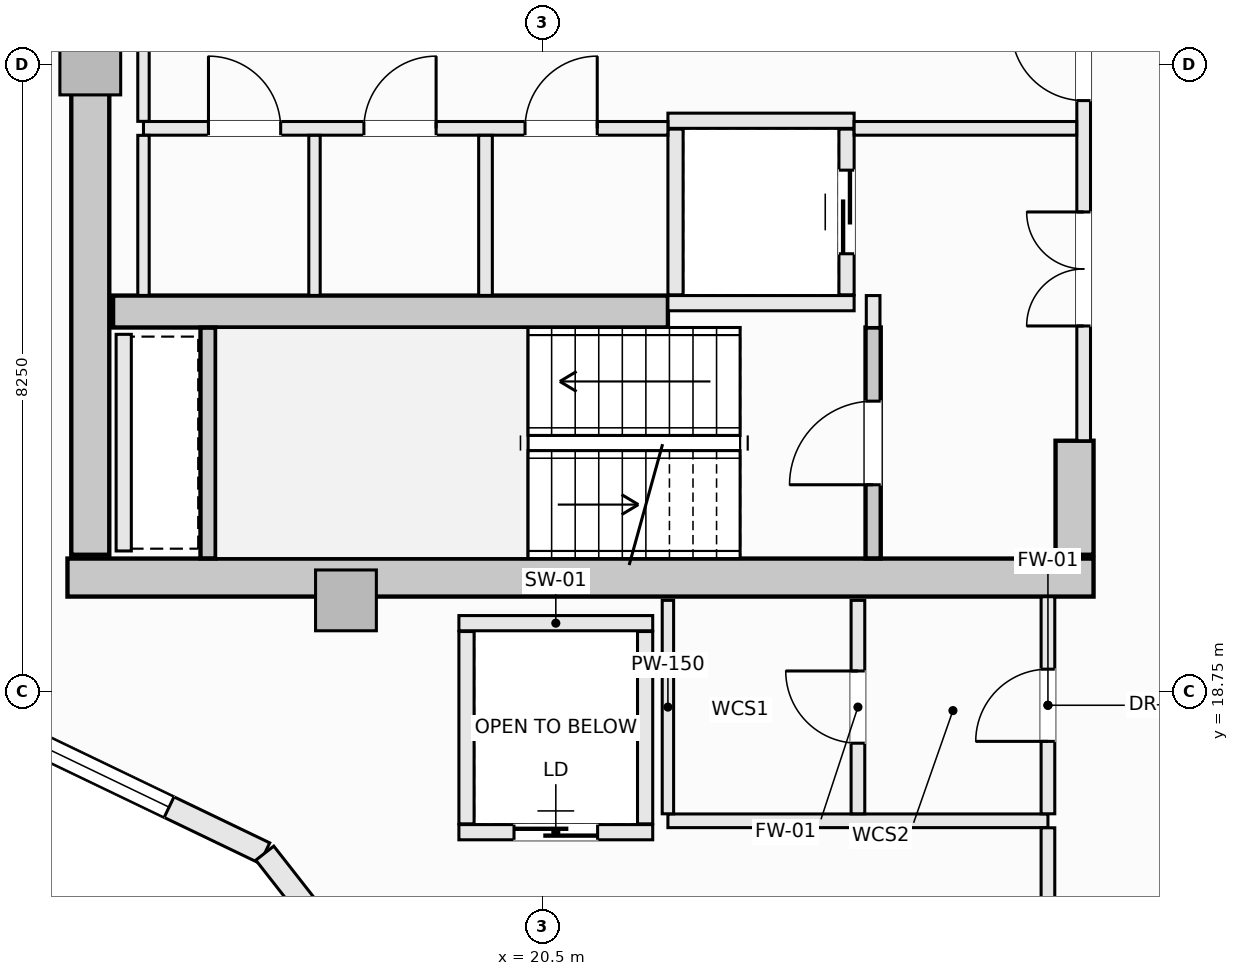
"""IFC4 building model, lengths in metres.
Left out: names, types, materials, properties, quantities, classifications, styles, units other than length and angle.
Written with IfcOpenShell. Run it as: python <this file> out.ifc"""

import sys

from ifc_helpers import new_model, si_unit, direction, frame, frame_2d, origin, origin_2d, place, context, subcontext, project, spatial, rectangle, extrude, element, fill, save


model = new_model("IFC4")
c1 = context("Model", 3, precision=1e-05, world=origin(), true_north=direction((0.0, 1.0)))
c2 = subcontext(c1, "Body", "Model", "MODEL_VIEW")
j1 = project(units=[si_unit("LENGTHUNIT", "METRE"), si_unit("PLANEANGLEUNIT", "RADIAN")], contexts=[c1])
p1 = place(None, origin())
s1 = spatial("IfcSite", under=j1, at=p1, CompositionType="ELEMENT")
p2 = place(p1, origin())
s2 = spatial("IfcBuilding", under=s1, at=p2, CompositionType="ELEMENT")
p3 = place(p2, frame((0.0, 0.0, 262.4)))
s3 = spatial("IfcBuildingStorey", under=s2, at=p3, CompositionType="ELEMENT", Elevation=262.4)
p4 = place(p3, frame((14.25, 20.25, -0.27), z_axis=(0.0, 0.0, 1.0), x_axis=(1.0, 0.0, 0.0)))
e1 = element("IfcWall", 1, at=p4, inside=s3, PredefinedType="SHEAR", context=c2, shape_type="SweptSolid", body=[
    extrude(rectangle(XDim=13.5, YDim=0.5, at=frame_2d((6.75, 0.0))), origin(), (0.0, 0.0, 1.0), 3.3),
])
p5 = place(p3, frame((14.55, 20.55, -0.27), z_axis=(0.0, 0.0, 1.0), x_axis=(0.0, 1.0, 0.0)))
e2 = element("IfcWall", 2, at=p5, inside=s3, PredefinedType="SHEAR", context=c2, shape_type="SweptSolid", body=[
    extrude(rectangle(XDim=12.9, YDim=0.5, at=frame_2d((6.45, 0.0))), origin(), (0.0, 0.0, 1.0), 3.3),
])
p6 = place(p3, frame((27.5, 20.55, -0.27), z_axis=(0.0, 0.0, 1.0), x_axis=(0.0, 1.0, 0.0)))
e3 = element("IfcWall", 3, at=p6, inside=s3, PredefinedType="SHEAR", context=c2, shape_type="SweptSolid", body=[
    extrude(rectangle(XDim=1.5, YDim=0.5, at=frame_2d((0.75, 0.0))), origin(), (0.0, 0.0, 1.0), 3.3),
])
p7 = place(p3, frame((14.85, 23.75, -0.27), z_axis=(0.0, 0.0, 1.0), x_axis=(1.0, 0.0, 0.0)))
e4 = element("IfcWall", 4, at=p7, inside=s3, PredefinedType="SHEAR", context=c2, shape_type="SweptSolid", body=[
    extrude(rectangle(XDim=7.3, YDim=0.42, at=frame_2d((3.65, 0.0))), origin(), (0.0, 0.0, 1.0), 3.3),
])
for number, where, z_axis, x_axis in (
    (5, (14.55, 27.0, -0.27), (0.0, 0.0, 1.0), (1.0, 0.0, 0.0)),
    (6, (17.914, 19.95, -0.27), (0.0, 0.0, 1.0), (1.0, 0.0, 0.0)),
):
    element("IfcColumn", number, at=place(p3, frame(where, z_axis=z_axis, x_axis=x_axis)), inside=s3, PredefinedType="PILASTER", context=c2, shape_type="SweptSolid", body=[
        extrude(rectangle(XDim=0.8, YDim=0.8, at=origin_2d()), origin(), (0.0, 0.0, 1.0), 3.3),
    ])
p8 = place(p3, frame((12.344, 18.788, 0.0), z_axis=(0.0, 0.0, 1.0), x_axis=(0.901346013132, -0.433099716706, 0.0)))
e7 = element("IfcWall", 7, at=p8, inside=s3, PredefinedType="SOLIDWALL", context=c2, shape_type="SweptSolid", body=[
    extrude(rectangle(XDim=4.994, YDim=0.3, at=frame_2d((2.497, 0.0))), origin(), (0.0, 0.0, 1.0), 2.605),
])
p9 = place(p8, frame((1.397, 0.0, 0.72)))
e8 = element("IfcOpeningElement", 8, at=p9, cuts=e7, PredefinedType="OPENING", context=c2, shape_type="SweptSolid", body=[
    extrude(rectangle(XDim=2.2, YDim=1.65, at=frame_2d((1.1, 0.825))), frame((0.0, 0.16, 0.0), z_axis=(0.0, -1.0, 0.0), x_axis=(1.0, 0.0, 0.0)), (0.0, 0.0, 1.0), 0.32),
])
p10 = place(p3, frame((16.846, 16.625, 0.0), z_axis=(0.0, 0.0, 1.0), x_axis=(0.616413297421, -0.78742278781, 0.0)))
e9 = element("IfcWall", 9, at=p10, inside=s3, PredefinedType="SOLIDWALL", context=c2, shape_type="SweptSolid", body=[
    extrude(rectangle(XDim=4.888, YDim=0.3, at=frame_2d((2.444, 0.0))), origin(), (0.0, 0.0, 1.0), 2.605),
])
p11 = place(p10, frame((1.344, 0.0, 0.72)))
e10 = element("IfcOpeningElement", 10, at=p11, cuts=e9, PredefinedType="OPENING", context=c2, shape_type="SweptSolid", body=[
    extrude(rectangle(XDim=2.2, YDim=1.65, at=frame_2d((1.1, 0.825))), frame((0.0, 0.16, 0.0), z_axis=(0.0, -1.0, 0.0), x_axis=(1.0, 0.0, 0.0)), (0.0, 0.0, 1.0), 0.32),
])
p12 = place(p3, frame((24.85, 20.502, -0.27), z_axis=(0.0, 0.0, 1.0), x_axis=(0.0, 1.0, 0.0)))
e11 = element("IfcWall", 11, at=p12, inside=s3, PredefinedType="SHEAR", context=c2, shape_type="SweptSolid", body=[
    extrude(rectangle(XDim=3.038, YDim=0.2, at=frame_2d((1.519, 0.0))), origin(), (0.0, 0.0, 1.0), 3.3),
])
p13 = place(p12, frame((0.969, 0.0, 0.27)))
e12 = element("IfcOpeningElement", 12, at=p13, cuts=e11, PredefinedType="OPENING", context=c2, shape_type="SweptSolid", body=[
    extrude(rectangle(XDim=1.1, YDim=2.15, at=frame_2d((0.55, 1.075))), frame((0.0, 0.11, 0.0), z_axis=(0.0, -1.0, 0.0), x_axis=(1.0, 0.0, 0.0)), (0.0, 0.0, 1.0), 0.22),
])
p14 = place(p3, frame((16.1, 20.502, -0.27), z_axis=(0.0, 0.0, 1.0), x_axis=(0.0, 1.0, 0.0)))
e13 = element("IfcWall", 13, at=p14, inside=s3, PredefinedType="SHEAR", context=c2, shape_type="SweptSolid", body=[
    extrude(rectangle(XDim=3.036, YDim=0.2, at=frame_2d((1.518, 0.0))), origin(), (0.0, 0.0, 1.0), 3.3),
])
for number, where, z_axis, x_axis in (
    (14, (22.15, 26.26, 0.0), (0.0, 0.0, 1.0), (1.0, 0.0, 0.0)),
    (15, (22.15, 23.86, 0.0), (0.0, 0.0, 1.0), (1.0, 0.0, 0.0)),
):
    element("IfcWall", number, at=place(p3, frame(where, z_axis=z_axis, x_axis=x_axis)), inside=s3, PredefinedType="SOLIDWALL", context=c2, shape_type="SweptSolid", body=[
        extrude(rectangle(XDim=2.45, YDim=0.2, at=frame_2d((1.225, 0.0))), origin(), (0.0, 0.0, 1.0), 3.03),
    ])
p15 = place(p3, frame((22.25, 23.97, 0.0), z_axis=(0.0, 0.0, 1.0), x_axis=(0.0, 1.0, 0.0)))
e16 = element("IfcWall", 16, at=p15, inside=s3, PredefinedType="SOLIDWALL", context=c2, shape_type="SweptSolid", body=[
    extrude(rectangle(XDim=2.18, YDim=0.2, at=frame_2d((1.09, 0.0))), origin(), (0.0, 0.0, 1.0), 3.03),
])
p16 = place(p3, frame((24.5, 23.97, 0.0), z_axis=(0.0, 0.0, 1.0), x_axis=(0.0, 1.0, 0.0)))
e17 = element("IfcWall", 17, at=p16, inside=s3, PredefinedType="SOLIDWALL", context=c2, shape_type="SweptSolid", body=[
    extrude(rectangle(XDim=2.18, YDim=0.2, at=frame_2d((1.09, 0.0))), origin(), (0.0, 0.0, 1.0), 3.03),
])
p17 = place(p16, frame((0.54, 0.0, 0.0)))
e18 = element("IfcOpeningElement", 18, at=p17, cuts=e17, PredefinedType="OPENING", context=c2, shape_type="SweptSolid", body=[
    extrude(rectangle(XDim=1.1, YDim=2.2, at=frame_2d((0.55, 1.1))), frame((0.0, 0.11, 0.0), z_axis=(0.0, -1.0, 0.0), x_axis=(1.0, 0.0, 0.0)), (0.0, 0.0, 1.0), 0.22),
])
p18 = place(p3, frame((19.4, 19.65, 0.0), z_axis=(0.0, 0.0, 1.0), x_axis=(1.0, 0.0, 0.0)))
e19 = element("IfcWall", 19, at=p18, inside=s3, PredefinedType="SOLIDWALL", context=c2, shape_type="SweptSolid", body=[
    extrude(rectangle(XDim=2.55, YDim=0.2, at=frame_2d((1.275, 0.0))), origin(), (0.0, 0.0, 1.0), 3.03),
])
p19 = place(p3, frame((19.4, 16.9, 0.0), z_axis=(0.0, 0.0, 1.0), x_axis=(1.0, 0.0, 0.0)))
e20 = element("IfcWall", 20, at=p19, inside=s3, PredefinedType="SOLIDWALL", context=c2, shape_type="SweptSolid", body=[
    extrude(rectangle(XDim=2.55, YDim=0.2, at=frame_2d((1.275, 0.0))), origin(), (0.0, 0.0, 1.0), 3.03),
])
p20 = place(p19, frame((0.725, 0.0, 0.0)))
e21 = element("IfcOpeningElement", 21, at=p20, cuts=e20, PredefinedType="OPENING", context=c2, shape_type="SweptSolid", body=[
    extrude(rectangle(XDim=1.1, YDim=2.2, at=frame_2d((0.55, 1.1))), frame((0.0, 0.11, 0.0), z_axis=(0.0, -1.0, 0.0), x_axis=(1.0, 0.0, 0.0)), (0.0, 0.0, 1.0), 0.22),
])
for number, where, z_axis, x_axis in (
    (22, (19.5, 17.01, 0.0), (0.0, 0.0, 1.0), (0.0, 1.0, 0.0)),
    (23, (21.85, 17.01, 0.0), (0.0, 0.0, 1.0), (0.0, 1.0, 0.0)),
):
    element("IfcWall", number, at=place(p3, frame(where, z_axis=z_axis, x_axis=x_axis)), inside=s3, PredefinedType="SOLIDWALL", context=c2, shape_type="SweptSolid", body=[
        extrude(rectangle(XDim=2.53, YDim=0.2, at=frame_2d((1.265, 0.0))), origin(), (0.0, 0.0, 1.0), 3.03),
    ])
p21 = place(p3, frame((14.99, 20.6, 0.0), z_axis=(0.0, 0.0, 1.0), x_axis=(0.0, 1.0, 0.0)))
e24 = element("IfcWall", 24, at=p21, inside=s3, PredefinedType="SOLIDWALL", context=c2, shape_type="SweptSolid", body=[
    extrude(rectangle(XDim=2.85, YDim=0.2, at=frame_2d((1.425, 0.0))), origin(), (0.0, 0.0, 1.0), 3.03),
])
p22 = place(p3, frame((24.85, 23.54, 0.0), z_axis=(0.0, 0.0, 1.0), x_axis=(0.0, 1.0, 0.0)))
e25 = element("IfcWall", 25, at=p22, inside=s3, PredefinedType="SOLIDWALL", context=c2, shape_type="SweptSolid", body=[
    extrude(rectangle(XDim=0.42, YDim=0.18, at=frame_2d((0.21, 0.0))), origin(), (0.0, 0.0, 1.0), 3.03),
])
p23 = place(p3, frame((27.62, 22.05, 0.0), z_axis=(0.0, 0.0, 1.0), x_axis=(0.0, 1.0, 0.0)))
e26 = element("IfcWall", 26, at=p23, inside=s3, PredefinedType="SOLIDWALL", context=c2, shape_type="SweptSolid", body=[
    extrude(rectangle(XDim=9.9, YDim=0.18, at=frame_2d((4.95, 0.0))), origin(), (0.0, 0.0, 1.0), 3.03),
])
p24 = place(p23, frame((4.475, 0.0, 0.0)))
e27 = element("IfcOpeningElement", 27, at=p24, cuts=e26, PredefinedType="OPENING", context=c2, shape_type="SweptSolid", body=[
    extrude(rectangle(XDim=0.95, YDim=2.1, at=frame_2d((0.475, 1.05))), frame((0.0, 0.1, 0.0), z_axis=(0.0, -1.0, 0.0), x_axis=(1.0, 0.0, 0.0)), (0.0, 0.0, 1.0), 0.2),
])
p25 = place(p23, frame((6.89, 0.0, 0.0)))
e28 = element("IfcOpeningElement", 28, at=p25, cuts=e26, PredefinedType="OPENING", context=c2, shape_type="SweptSolid", body=[
    extrude(rectangle(XDim=1.5, YDim=2.2, at=frame_2d((0.75, 1.1))), frame((0.0, 0.1, 0.0), z_axis=(0.0, -1.0, 0.0), x_axis=(1.0, 0.0, 0.0)), (0.0, 0.0, 1.0), 0.2),
])
p26 = place(p23, frame((1.51, 0.0, 0.0)))
e29 = element("IfcOpeningElement", 29, at=p26, cuts=e26, PredefinedType="OPENING", context=c2, shape_type="SweptSolid", body=[
    extrude(rectangle(XDim=1.5, YDim=2.2, at=frame_2d((0.75, 1.1))), frame((0.0, 0.1, 0.0), z_axis=(0.0, -1.0, 0.0), x_axis=(1.0, 0.0, 0.0)), (0.0, 0.0, 1.0), 0.2),
])
p27 = place(p3, frame((15.25, 26.16, 0.0), z_axis=(0.0, 0.0, 1.0), x_axis=(1.0, 0.0, 0.0)))
e30 = element("IfcWall", 30, at=p27, inside=s3, PredefinedType="SOLIDWALL", context=c2, shape_type="SweptSolid", body=[
    extrude(rectangle(XDim=6.9, YDim=0.18, at=frame_2d((3.45, 0.0))), origin(), (0.0, 0.0, 1.0), 3.03),
])
p28 = place(p27, frame((5.02, 0.0, 0.0)))
e31 = element("IfcOpeningElement", 31, at=p28, cuts=e30, PredefinedType="OPENING", context=c2, shape_type="SweptSolid", body=[
    extrude(rectangle(XDim=0.95, YDim=2.1, at=frame_2d((0.475, 1.05))), frame((0.0, 0.1, 0.0), z_axis=(0.0, -1.0, 0.0), x_axis=(1.0, 0.0, 0.0)), (0.0, 0.0, 1.0), 0.2),
])
p29 = place(p27, frame((0.855, 0.0, 0.0)))
e32 = element("IfcOpeningElement", 32, at=p29, cuts=e30, PredefinedType="OPENING", context=c2, shape_type="SweptSolid", body=[
    extrude(rectangle(XDim=0.95, YDim=2.1, at=frame_2d((0.475, 1.05))), frame((0.0, 0.1, 0.0), z_axis=(0.0, -1.0, 0.0), x_axis=(1.0, 0.0, 0.0)), (0.0, 0.0, 1.0), 0.2),
])
p30 = place(p27, frame((2.9, 0.0, 0.0)))
e33 = element("IfcOpeningElement", 33, at=p30, cuts=e30, PredefinedType="OPENING", context=c2, shape_type="SweptSolid", body=[
    extrude(rectangle(XDim=0.95, YDim=2.1, at=frame_2d((0.475, 1.05))), frame((0.0, 0.1, 0.0), z_axis=(0.0, -1.0, 0.0), x_axis=(1.0, 0.0, 0.0)), (0.0, 0.0, 1.0), 0.2),
])
p31 = place(p3, frame((24.6, 26.16, 0.0), z_axis=(0.0, 0.0, 1.0), x_axis=(1.0, 0.0, 0.0)))
e34 = element("IfcWall", 34, at=p31, inside=s3, PredefinedType="SOLIDWALL", context=c2, shape_type="SweptSolid", body=[
    extrude(rectangle(XDim=2.928, YDim=0.18, at=frame_2d((1.464, 0.0))), origin(), (0.0, 0.0, 1.0), 3.03),
])
p32 = place(p3, frame((15.25, 23.962, 0.0), z_axis=(0.0, 0.0, 1.0), x_axis=(0.0, 1.0, 0.0)))
e35 = element("IfcWall", 35, at=p32, inside=s3, PredefinedType="PARTITIONING", context=c2, shape_type="SweptSolid", body=[
    extrude(rectangle(XDim=2.106, YDim=0.15, at=frame_2d((1.053, 0.0))), origin(), (0.0, 0.0, 1.0), 3.03),
])
p33 = place(p3, frame((15.25, 26.252, 0.0), z_axis=(0.0, 0.0, 1.0), x_axis=(0.0, 1.0, 0.0)))
e36 = element("IfcWall", 36, at=p33, inside=s3, PredefinedType="PARTITIONING", context=c2, shape_type="SweptSolid", body=[
    extrude(rectangle(XDim=1.496, YDim=0.15, at=frame_2d((0.748, 0.0))), origin(), (0.0, 0.0, 1.0), 3.03),
])
p34 = place(p3, frame((19.75, 23.962, 0.0), z_axis=(0.0, 0.0, 1.0), x_axis=(0.0, 1.0, 0.0)))
e37 = element("IfcWall", 37, at=p34, inside=s3, PredefinedType="SOLIDWALL", context=c2, shape_type="SweptSolid", body=[
    extrude(rectangle(XDim=2.106, YDim=0.18, at=frame_2d((1.053, 0.0))), origin(), (0.0, 0.0, 1.0), 3.03),
])
p35 = place(p3, frame((17.5, 23.962, 0.0), z_axis=(0.0, 0.0, 1.0), x_axis=(0.0, 1.0, 0.0)))
e38 = element("IfcWall", 38, at=p35, inside=s3, PredefinedType="PARTITIONING", context=c2, shape_type="SweptSolid", body=[
    extrude(rectangle(XDim=2.106, YDim=0.15, at=frame_2d((1.053, 0.0))), origin(), (0.0, 0.0, 1.0), 3.03),
])
p36 = place(p3, frame((22.15, 17.05, 0.0), z_axis=(0.0, 0.0, 1.0), x_axis=(1.0, 0.0, 0.0)))
e39 = element("IfcWall", 39, at=p36, inside=s3, PredefinedType="SOLIDWALL", context=c2, shape_type="SweptSolid", body=[
    extrude(rectangle(XDim=5.0, YDim=0.18, at=frame_2d((2.5, 0.0))), origin(), (0.0, 0.0, 1.0), 3.03),
])
p37 = place(p3, frame((22.15, 17.142, 0.0), z_axis=(0.0, 0.0, 1.0), x_axis=(0.0, 1.0, 0.0)))
e40 = element("IfcWall", 40, at=p37, inside=s3, PredefinedType="PARTITIONING", context=c2, shape_type="SweptSolid", body=[
    extrude(rectangle(XDim=2.808, YDim=0.15, at=frame_2d((1.404, 0.0))), origin(), (0.0, 0.0, 1.0), 3.03),
])
p38 = place(p3, frame((24.65, 17.142, 0.0), z_axis=(0.0, 0.0, 1.0), x_axis=(0.0, 1.0, 0.0)))
e41 = element("IfcWall", 41, at=p38, inside=s3, PredefinedType="SOLIDWALL", context=c2, shape_type="SweptSolid", body=[
    extrude(rectangle(XDim=2.808, YDim=0.18, at=frame_2d((1.404, 0.0))), origin(), (0.0, 0.0, 1.0), 3.03),
])
p39 = place(p38, frame((0.929, 0.0, 0.0)))
e42 = element("IfcOpeningElement", 42, at=p39, cuts=e41, PredefinedType="OPENING", context=c2, shape_type="SweptSolid", body=[
    extrude(rectangle(XDim=0.95, YDim=2.1, at=frame_2d((0.475, 1.05))), frame((0.0, 0.1, 0.0), z_axis=(0.0, -1.0, 0.0), x_axis=(1.0, 0.0, 0.0)), (0.0, 0.0, 1.0), 0.2),
])
p40 = place(p3, frame((27.15, 13.181, 0.0), z_axis=(0.0, 0.0, 1.0), x_axis=(0.0, 1.0, 0.0)))
e43 = element("IfcWall", 43, at=p40, inside=s3, PredefinedType="SOLIDWALL", context=c2, shape_type="SweptSolid", body=[
    extrude(rectangle(XDim=3.777, YDim=0.18, at=frame_2d((1.889, 0.0))), origin(), (0.0, 0.0, 1.0), 3.03),
])
p41 = place(p40, frame((1.414, 0.0, 0.0)))
e44 = element("IfcOpeningElement", 44, at=p41, cuts=e43, PredefinedType="OPENING", context=c2, shape_type="SweptSolid", body=[
    extrude(rectangle(XDim=0.95, YDim=2.1, at=frame_2d((0.475, 1.05))), frame((0.0, 0.1, 0.0), z_axis=(0.0, -1.0, 0.0), x_axis=(1.0, 0.0, 0.0)), (0.0, 0.0, 1.0), 0.2),
])
p42 = place(p3, frame((27.15, 17.142, 0.0), z_axis=(0.0, 0.0, 1.0), x_axis=(0.0, 1.0, 0.0)))
e45 = element("IfcWall", 45, at=p42, inside=s3, PredefinedType="SOLIDWALL", context=c2, shape_type="SweptSolid", body=[
    extrude(rectangle(XDim=2.856, YDim=0.18, at=frame_2d((1.428, 0.0))), origin(), (0.0, 0.0, 1.0), 3.03),
])
p43 = place(p42, frame((0.953, 0.0, 0.0)))
e46 = element("IfcOpeningElement", 46, at=p43, cuts=e45, PredefinedType="OPENING", context=c2, shape_type="SweptSolid", body=[
    extrude(rectangle(XDim=0.95, YDim=2.1, at=frame_2d((0.475, 1.05))), frame((0.0, 0.1, 0.0), z_axis=(0.0, -1.0, 0.0), x_axis=(1.0, 0.0, 0.0)), (0.0, 0.0, 1.0), 0.2),
])
p44 = place(p9, origin())
e47 = element("IfcWindow", 47, at=p44, inside=s3, PartitioningType="SINGLE_PANEL", PredefinedType="WINDOW", context=c2, shape_type="SweptSolid", body=[
    extrude(rectangle(XDim=2.2, YDim=1.65, at=frame_2d((1.1, 0.825))), frame((0.0, 0.03, 0.0), z_axis=(0.0, -1.0, 0.0), x_axis=(1.0, 0.0, 0.0)), (0.0, 0.0, 1.0), 0.06),
])
fill(e8, e47)
p45 = place(p13, origin())
e48 = element("IfcDoor", 48, at=p45, inside=s3, OperationType="SINGLE_SWING_LEFT", PredefinedType="DOOR", context=c2, shape_type="SweptSolid", body=[
    extrude(rectangle(XDim=1.1, YDim=2.15, at=frame_2d((0.55, 1.075))), frame((0.0, 0.025, 0.0), z_axis=(0.0, -1.0, 0.0), x_axis=(1.0, 0.0, 0.0)), (0.0, 0.0, 1.0), 0.05),
])
fill(e12, e48)
p46 = place(p17, origin())
e49 = element("IfcDoor", 49, at=p46, inside=s3, OperationType="SLIDING_TO_LEFT", PredefinedType="DOOR", context=c2, shape_type="SweptSolid", body=[
    extrude(rectangle(XDim=1.1, YDim=2.2, at=frame_2d((0.55, 1.1))), frame((0.0, 0.025, 0.0), z_axis=(0.0, -1.0, 0.0), x_axis=(1.0, 0.0, 0.0)), (0.0, 0.0, 1.0), 0.05),
])
fill(e18, e49)
p47 = place(p20, origin())
e50 = element("IfcDoor", 50, at=p47, inside=s3, OperationType="SLIDING_TO_LEFT", PredefinedType="DOOR", context=c2, shape_type="SweptSolid", body=[
    extrude(rectangle(XDim=1.1, YDim=2.2, at=frame_2d((0.55, 1.1))), frame((0.0, 0.025, 0.0), z_axis=(0.0, -1.0, 0.0), x_axis=(1.0, 0.0, 0.0)), (0.0, 0.0, 1.0), 0.05),
])
fill(e21, e50)
p48 = place(p24, origin())
e51 = element("IfcDoor", 51, at=p48, inside=s3, OperationType="SINGLE_SWING_RIGHT", PredefinedType="DOOR", context=c2, shape_type="SweptSolid", body=[
    extrude(rectangle(XDim=0.95, YDim=2.1, at=frame_2d((0.475, 1.05))), frame((0.0, 0.025, 0.0), z_axis=(0.0, -1.0, 0.0), x_axis=(1.0, 0.0, 0.0)), (0.0, 0.0, 1.0), 0.05),
])
fill(e27, e51)
p49 = place(p26, origin())
e52 = element("IfcDoor", 52, at=p49, inside=s3, OperationType="DOUBLE_DOOR_SINGLE_SWING", PredefinedType="DOOR", context=c2, shape_type="SweptSolid", body=[
    extrude(rectangle(XDim=1.5, YDim=2.2, at=frame_2d((0.75, 1.1))), frame((0.0, 0.025, 0.0), z_axis=(0.0, -1.0, 0.0), x_axis=(1.0, 0.0, 0.0)), (0.0, 0.0, 1.0), 0.05),
])
fill(e29, e52)
p50 = place(p28, origin())
e53 = element("IfcDoor", 53, at=p50, inside=s3, OperationType="SINGLE_SWING_RIGHT", PredefinedType="DOOR", context=c2, shape_type="SweptSolid", body=[
    extrude(rectangle(XDim=0.95, YDim=2.1, at=frame_2d((0.475, 1.05))), frame((0.0, 0.025, 0.0), z_axis=(0.0, -1.0, 0.0), x_axis=(1.0, 0.0, 0.0)), (0.0, 0.0, 1.0), 0.05),
])
fill(e31, e53)
p51 = place(p29, origin())
e54 = element("IfcDoor", 54, at=p51, inside=s3, OperationType="SINGLE_SWING_LEFT", PredefinedType="DOOR", context=c2, shape_type="SweptSolid", body=[
    extrude(rectangle(XDim=0.95, YDim=2.1, at=frame_2d((0.475, 1.05))), frame((0.0, 0.025, 0.0), z_axis=(0.0, -1.0, 0.0), x_axis=(1.0, 0.0, 0.0)), (0.0, 0.0, 1.0), 0.05),
])
fill(e32, e54)
p52 = place(p30, origin())
e55 = element("IfcDoor", 55, at=p52, inside=s3, OperationType="SINGLE_SWING_RIGHT", PredefinedType="DOOR", context=c2, shape_type="SweptSolid", body=[
    extrude(rectangle(XDim=0.95, YDim=2.1, at=frame_2d((0.475, 1.05))), frame((0.0, 0.025, 0.0), z_axis=(0.0, -1.0, 0.0), x_axis=(1.0, 0.0, 0.0)), (0.0, 0.0, 1.0), 0.05),
])
fill(e33, e55)
p53 = place(p43, origin())
e56 = element("IfcDoor", 56, at=p53, inside=s3, OperationType="SINGLE_SWING_LEFT", PredefinedType="DOOR", context=c2, shape_type="SweptSolid", body=[
    extrude(rectangle(XDim=0.95, YDim=2.1, at=frame_2d((0.475, 1.05))), frame((0.0, 0.025, 0.0), z_axis=(0.0, -1.0, 0.0), x_axis=(1.0, 0.0, 0.0)), (0.0, 0.0, 1.0), 0.05),
])
fill(e46, e56)
p54 = place(p39, origin())
e57 = element("IfcDoor", 57, at=p54, inside=s3, OperationType="SINGLE_SWING_RIGHT", PredefinedType="DOOR", context=c2, shape_type="SweptSolid", body=[
    extrude(rectangle(XDim=0.95, YDim=2.1, at=frame_2d((0.475, 1.05))), frame((0.0, 0.025, 0.0), z_axis=(0.0, -1.0, 0.0), x_axis=(1.0, 0.0, 0.0)), (0.0, 0.0, 1.0), 0.05),
])
fill(e42, e57)
save(model, sys.argv[1])
